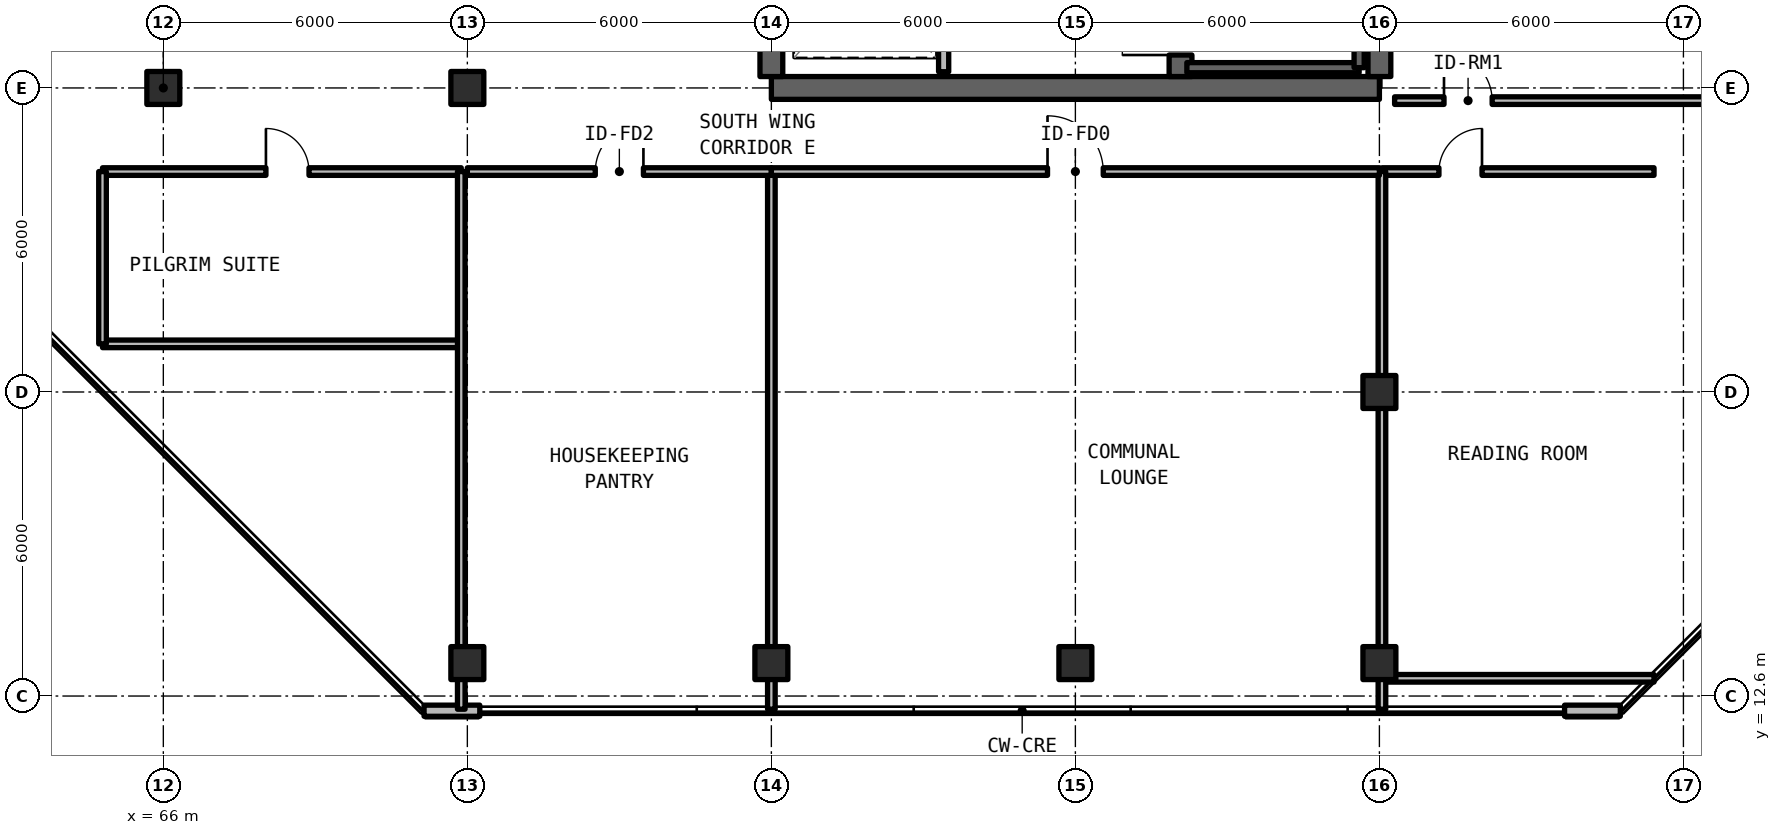
"""IFC4 building model, lengths in metres.
Left out: names, types, materials, properties, quantities, classifications, styles, units other than length and angle.
Written with IfcOpenShell. Run it as: python <this file> out.ifc"""

import sys

from ifc_helpers import new_model, si_unit, direction, frame, frame_2d, origin, origin_2d, place, context, subcontext, project, spatial, rectangle, extrude, element, fill, save


model = new_model("IFC4")
c1 = context("Model", 3, precision=1e-05, world=origin(), true_north=direction((0.0, 1.0)))
c2 = subcontext(c1, "Body", "Model", "MODEL_VIEW")
j1 = project(units=[si_unit("LENGTHUNIT", "METRE"), si_unit("PLANEANGLEUNIT", "RADIAN")], contexts=[c1])
p1 = place(None, origin())
s1 = spatial("IfcSite", under=j1, at=p1, CompositionType="ELEMENT")
p2 = place(p1, origin())
s2 = spatial("IfcBuilding", under=s1, at=p2, CompositionType="ELEMENT")
p3 = place(p2, frame((0.0, 0.0, 257.07)))
s3 = spatial("IfcBuildingStorey", under=s2, at=p3, CompositionType="ELEMENT", Elevation=257.07)
p4 = place(p3, frame((78.0, 24.6, 0.0), z_axis=(0.0, 0.0, 1.0), x_axis=(1.0, 0.0, 0.0)))
e1 = element("IfcWall", 1, at=p4, inside=s3, PredefinedType="SHEAR", context=c2, shape_type="SweptSolid", body=[
    extrude(rectangle(XDim=12.0, YDim=0.45, at=frame_2d((6.0, 0.0))), origin(), (0.0, 0.0, 1.0), 3.63),
])
p5 = place(p3, frame((90.0, 24.825, 0.0), z_axis=(0.0, 0.0, 1.0), x_axis=(0.0, 1.0, 0.0)))
e2 = element("IfcWall", 2, at=p5, inside=s3, PredefinedType="SHEAR", context=c2, shape_type="SweptSolid", body=[
    extrude(rectangle(XDim=17.55, YDim=0.45, at=frame_2d((8.775, 0.0))), origin(), (0.0, 0.0, 1.0), 3.63),
])
p6 = place(p3, frame((78.0, 24.825, 0.0), z_axis=(0.0, 0.0, 1.0), x_axis=(0.0, 1.0, 0.0)))
e3 = element("IfcWall", 3, at=p6, inside=s3, PredefinedType="SHEAR", context=c2, shape_type="SweptSolid", body=[
    extrude(rectangle(XDim=8.975, YDim=0.45, at=frame_2d((4.488, 0.0))), origin(), (0.0, 0.0, 1.0), 3.63),
])
p7 = place(p3, frame((86.075, 24.825, 0.0), z_axis=(0.0, 0.0, 1.0), x_axis=(0.0, 1.0, 0.0)))
e4 = element("IfcWall", 4, at=p7, inside=s3, PredefinedType="SHEAR", context=c2, shape_type="SweptSolid", body=[
    extrude(rectangle(XDim=17.55, YDim=0.45, at=frame_2d((8.775, 0.0))), origin(), (0.0, 0.0, 1.0), 3.63),
])
p8 = place(p7, frame((0.425, 0.0, 0.0)))
e5 = element("IfcOpeningElement", 5, at=p8, cuts=e4, PredefinedType="OPENING", context=c2, shape_type="SweptSolid", body=[
    extrude(rectangle(XDim=1.15, YDim=2.15, at=frame_2d((0.575, 1.075))), frame((0.0, 0.235, 0.0), z_axis=(0.0, -1.0, 0.0), x_axis=(1.0, 0.0, 0.0)), (0.0, 0.0, 1.0), 0.47),
])
p9 = place(p7, frame((9.625, 0.0, 0.0)))
e6 = element("IfcOpeningElement", 6, at=p9, cuts=e4, PredefinedType="OPENING", context=c2, shape_type="SweptSolid", body=[
    extrude(rectangle(XDim=1.15, YDim=2.15, at=frame_2d((0.575, 1.075))), frame((0.0, 0.235, 0.0), z_axis=(0.0, -1.0, 0.0), x_axis=(1.0, 0.0, 0.0)), (0.0, 0.0, 1.0), 0.47),
])
for number, where, z_axis, x_axis in (
    (7, (66.0, 24.6, 0.0), (0.0, 0.0, 1.0), (1.0, 0.0, 0.0)),
    (8, (72.0, 24.6, 0.0), (0.0, 0.0, 1.0), (1.0, 0.0, 0.0)),
    (9, (90.0, 18.6, 0.0), (0.0, 0.0, 1.0), (1.0, 0.0, 0.0)),
    (10, (72.0, 13.25, 0.0), (0.0, 0.0, 1.0), (1.0, 0.0, 0.0)),
    (11, (78.0, 13.25, 0.0), (0.0, 0.0, 1.0), (1.0, 0.0, 0.0)),
    (12, (84.0, 13.25, 0.0), (0.0, 0.0, 1.0), (1.0, 0.0, 0.0)),
    (13, (90.0, 13.25, 0.0), (0.0, 0.0, 1.0), (1.0, 0.0, 0.0)),
):
    element("IfcColumn", number, at=place(p3, frame(where, z_axis=z_axis, x_axis=x_axis)), inside=s3, PredefinedType="COLUMN", context=c2, shape_type="SweptSolid", body=[
        extrude(rectangle(XDim=0.65, YDim=0.65, at=origin_2d()), origin(), (0.0, 0.0, 1.0), 3.63),
    ])
for number, where, z_axis, x_axis in (
    (14, (71.146, 12.31, 0.0), (0.0, 0.0, 1.0), (1.0, 0.0, 0.0)),
    (15, (93.654, 12.31, 0.0), (0.0, 0.0, 1.0), (1.0, 0.0, 0.0)),
):
    element("IfcWall", number, at=place(p3, frame(where, z_axis=z_axis, x_axis=x_axis)), inside=s3, PredefinedType="SOLIDWALL", context=c2, shape_type="SweptSolid", body=[
        extrude(rectangle(XDim=1.1, YDim=0.22, at=frame_2d((0.55, 0.0))), origin(), (0.0, 0.0, 1.0), 3.41),
    ])
p10 = place(p3, frame((81.4, 24.92, 0.0), z_axis=(0.0, 0.0, 1.0), x_axis=(0.0, 1.0, 0.0)))
e16 = element("IfcWall", 16, at=p10, inside=s3, PredefinedType="SOLIDWALL", context=c2, shape_type="SweptSolid", body=[
    extrude(rectangle(XDim=3.58, YDim=0.2, at=frame_2d((1.79, 0.0))), origin(), (0.0, 0.0, 1.0), 2.63),
])
p11 = place(p10, frame((1.3, 0.0, 0.0)))
e17 = element("IfcOpeningElement", 17, at=p11, cuts=e16, PredefinedType="OPENING", context=c2, shape_type="SweptSolid", body=[
    extrude(rectangle(XDim=1.1, YDim=2.2, at=frame_2d((0.55, 1.1))), frame((0.0, 0.11, 0.0), z_axis=(0.0, -1.0, 0.0), x_axis=(1.0, 0.0, 0.0)), (0.0, 0.0, 1.0), 0.22),
])
p12 = place(p3, frame((64.8, 19.55, 0.0), z_axis=(0.0, 0.0, 1.0), x_axis=(1.0, 0.0, 0.0)))
e18 = element("IfcWall", 18, at=p12, inside=s3, PredefinedType="SOLIDWALL", context=c2, shape_type="SweptSolid", body=[
    extrude(rectangle(XDim=7.08, YDim=0.15, at=frame_2d((3.54, 0.0))), origin(), (0.0, 0.0, 1.0), 2.63),
])
p13 = place(p3, frame((64.8, 22.95, 0.0), z_axis=(0.0, 0.0, 1.0), x_axis=(1.0, 0.0, 0.0)))
e19 = element("IfcWall", 19, at=p13, inside=s3, PredefinedType="SOLIDWALL", context=c2, shape_type="SweptSolid", body=[
    extrude(rectangle(XDim=7.08, YDim=0.15, at=frame_2d((3.54, 0.0))), origin(), (0.0, 0.0, 1.0), 2.63),
])
p14 = place(p13, frame((3.225, 0.0, 0.0)))
e20 = element("IfcOpeningElement", 20, at=p14, cuts=e19, PredefinedType="OPENING", context=c2, shape_type="SweptSolid", body=[
    extrude(rectangle(XDim=0.85, YDim=2.1, at=frame_2d((0.425, 1.05))), frame((0.0, 0.085, 0.0), z_axis=(0.0, -1.0, 0.0), x_axis=(1.0, 0.0, 0.0)), (0.0, 0.0, 1.0), 0.17),
])
p15 = place(p3, frame((64.8, 19.55, 0.0), z_axis=(0.0, 0.0, 1.0), x_axis=(0.0, 1.0, 0.0)))
e21 = element("IfcWall", 21, at=p15, inside=s3, PredefinedType="SOLIDWALL", context=c2, shape_type="SweptSolid", body=[
    extrude(rectangle(XDim=3.4, YDim=0.15, at=frame_2d((1.7, 0.0))), origin(), (0.0, 0.0, 1.0), 2.63),
])
p16 = place(p3, frame((71.88, 12.34, 0.0), z_axis=(0.0, 0.0, 1.0), x_axis=(0.0, 1.0, 0.0)))
e22 = element("IfcWall", 22, at=p16, inside=s3, PredefinedType="SOLIDWALL", context=c2, shape_type="SweptSolid", body=[
    extrude(rectangle(XDim=10.61, YDim=0.15, at=frame_2d((5.305, 0.0))), origin(), (0.0, 0.0, 1.0), 2.63),
])
p17 = place(p3, frame((90.3, 24.35, 0.0), z_axis=(0.0, 0.0, 1.0), x_axis=(1.0, 0.0, 0.0)))
e23 = element("IfcWall", 23, at=p17, inside=s3, PredefinedType="SOLIDWALL", context=c2, shape_type="SweptSolid", body=[
    extrude(rectangle(XDim=8.52, YDim=0.15, at=frame_2d((4.26, 0.0))), origin(), (0.0, 0.0, 1.0), 2.63),
])
p18 = place(p17, frame((0.975, 0.0, 0.0)))
e24 = element("IfcOpeningElement", 24, at=p18, cuts=e23, PredefinedType="OPENING", context=c2, shape_type="SweptSolid", body=[
    extrude(rectangle(XDim=0.95, YDim=2.15, at=frame_2d((0.475, 1.075))), frame((0.0, 0.085, 0.0), z_axis=(0.0, -1.0, 0.0), x_axis=(1.0, 0.0, 0.0)), (0.0, 0.0, 1.0), 0.17),
])
p19 = place(p3, frame((90.05, 12.95, 0.0), z_axis=(0.0, 0.0, 1.0), x_axis=(1.0, 0.0, 0.0)))
e25 = element("IfcWall", 25, at=p19, inside=s3, PredefinedType="SOLIDWALL", context=c2, shape_type="SweptSolid", body=[
    extrude(rectangle(XDim=5.37, YDim=0.15, at=frame_2d((2.685, 0.0))), origin(), (0.0, 0.0, 1.0), 2.63),
])
p20 = place(p3, frame((90.05, 22.95, 0.0), z_axis=(0.0, 0.0, 1.0), x_axis=(1.0, 0.0, 0.0)))
e26 = element("IfcWall", 26, at=p20, inside=s3, PredefinedType="SOLIDWALL", context=c2, shape_type="SweptSolid", body=[
    extrude(rectangle(XDim=5.37, YDim=0.15, at=frame_2d((2.685, 0.0))), origin(), (0.0, 0.0, 1.0), 2.63),
])
p21 = place(p20, frame((1.125, 0.0, 0.0)))
e27 = element("IfcOpeningElement", 27, at=p21, cuts=e26, PredefinedType="OPENING", context=c2, shape_type="SweptSolid", body=[
    extrude(rectangle(XDim=0.85, YDim=2.1, at=frame_2d((0.425, 1.05))), frame((0.0, 0.085, 0.0), z_axis=(0.0, -1.0, 0.0), x_axis=(1.0, 0.0, 0.0)), (0.0, 0.0, 1.0), 0.17),
])
for number, where, z_axis, x_axis in (
    (28, (90.05, 12.34, 0.0), (0.0, 0.0, 1.0), (0.0, 1.0, 0.0)),
    (29, (78.0, 12.34, 0.0), (0.0, 0.0, 1.0), (0.0, 1.0, 0.0)),
):
    element("IfcWall", number, at=place(p3, frame(where, z_axis=z_axis, x_axis=x_axis)), inside=s3, PredefinedType="SOLIDWALL", context=c2, shape_type="SweptSolid", body=[
        extrude(rectangle(XDim=10.61, YDim=0.15, at=frame_2d((5.305, 0.0))), origin(), (0.0, 0.0, 1.0), 2.63),
    ])
p22 = place(p3, frame((72.0, 22.95, 0.0), z_axis=(0.0, 0.0, 1.0), x_axis=(1.0, 0.0, 0.0)))
e30 = element("IfcWall", 30, at=p22, inside=s3, PredefinedType="SOLIDWALL", context=c2, shape_type="SweptSolid", body=[
    extrude(rectangle(XDim=6.0, YDim=0.15, at=frame_2d((3.0, 0.0))), origin(), (0.0, 0.0, 1.0), 2.63),
])
p23 = place(p22, frame((2.525, 0.0, 0.0)))
e31 = element("IfcOpeningElement", 31, at=p23, cuts=e30, PredefinedType="OPENING", context=c2, shape_type="SweptSolid", body=[
    extrude(rectangle(XDim=0.95, YDim=2.15, at=frame_2d((0.475, 1.075))), frame((0.0, 0.085, 0.0), z_axis=(0.0, -1.0, 0.0), x_axis=(1.0, 0.0, 0.0)), (0.0, 0.0, 1.0), 0.17),
])
p24 = place(p3, frame((78.0, 22.95, 0.0), z_axis=(0.0, 0.0, 1.0), x_axis=(1.0, 0.0, 0.0)))
e32 = element("IfcWall", 32, at=p24, inside=s3, PredefinedType="SOLIDWALL", context=c2, shape_type="SweptSolid", body=[
    extrude(rectangle(XDim=12.0, YDim=0.15, at=frame_2d((6.0, 0.0))), origin(), (0.0, 0.0, 1.0), 2.63),
])
p25 = place(p24, frame((5.45, 0.0, 0.0)))
e33 = element("IfcOpeningElement", 33, at=p25, cuts=e32, PredefinedType="OPENING", context=c2, shape_type="SweptSolid", body=[
    extrude(rectangle(XDim=1.1, YDim=2.15, at=frame_2d((0.55, 1.075))), frame((0.0, 0.085, 0.0), z_axis=(0.0, -1.0, 0.0), x_axis=(1.0, 0.0, 0.0)), (0.0, 0.0, 1.0), 0.17),
])
p26 = place(p3, frame((86.2, 25.0, 0.0), z_axis=(0.0, 0.0, 1.0), x_axis=(1.0, 0.0, 0.0)))
e34 = element("IfcWall", 34, at=p26, inside=s3, PredefinedType="SOLIDWALL", context=c2, shape_type="SweptSolid", body=[
    extrude(rectangle(XDim=3.4, YDim=0.2, at=frame_2d((1.7, 0.0))), origin(), (0.0, 0.0, 1.0), 3.63),
])
p27 = place(p3, frame((89.6, 25.0, 0.0), z_axis=(0.0, 0.0, 1.0), x_axis=(0.0, 1.0, 0.0)))
e35 = element("IfcWall", 35, at=p27, inside=s3, PredefinedType="SOLIDWALL", context=c2, shape_type="SweptSolid", body=[
    extrude(rectangle(XDim=8.0, YDim=0.2, at=frame_2d((4.0, 0.0))), origin(), (0.0, 0.0, 1.0), 3.63),
])
p28 = place(p14, origin())
e36 = element("IfcDoor", 36, at=p28, inside=s3, OperationType="SINGLE_SWING_LEFT", PredefinedType="DOOR", context=c2, shape_type="SweptSolid", body=[
    extrude(rectangle(XDim=0.85, YDim=2.1, at=frame_2d((0.425, 1.05))), frame((0.0, 0.025, 0.0), z_axis=(0.0, -1.0, 0.0), x_axis=(1.0, 0.0, 0.0)), (0.0, 0.0, 1.0), 0.05),
])
fill(e20, e36)
p29 = place(p18, origin())
e37 = element("IfcDoor", 37, at=p29, inside=s3, OperationType="SINGLE_SWING_LEFT", PredefinedType="DOOR", context=c2, shape_type="SweptSolid", body=[
    extrude(rectangle(XDim=0.95, YDim=2.15, at=frame_2d((0.475, 1.075))), frame((0.0, 0.025, 0.0), z_axis=(0.0, -1.0, 0.0), x_axis=(1.0, 0.0, 0.0)), (0.0, 0.0, 1.0), 0.05),
])
fill(e24, e37)
p30 = place(p21, origin())
e38 = element("IfcDoor", 38, at=p30, inside=s3, OperationType="SINGLE_SWING_RIGHT", PredefinedType="DOOR", context=c2, shape_type="SweptSolid", body=[
    extrude(rectangle(XDim=0.85, YDim=2.1, at=frame_2d((0.425, 1.05))), frame((0.0, 0.025, 0.0), z_axis=(0.0, -1.0, 0.0), x_axis=(1.0, 0.0, 0.0)), (0.0, 0.0, 1.0), 0.05),
])
fill(e27, e38)
p31 = place(p23, origin())
e39 = element("IfcDoor", 39, at=p31, inside=s3, OperationType="SINGLE_SWING_RIGHT", PredefinedType="DOOR", context=c2, shape_type="SweptSolid", body=[
    extrude(rectangle(XDim=0.95, YDim=2.15, at=frame_2d((0.475, 1.075))), frame((0.0, 0.025, 0.0), z_axis=(0.0, -1.0, 0.0), x_axis=(1.0, 0.0, 0.0)), (0.0, 0.0, 1.0), 0.05),
])
fill(e31, e39)
p32 = place(p25, origin())
e40 = element("IfcDoor", 40, at=p32, inside=s3, OperationType="SINGLE_SWING_LEFT", PredefinedType="DOOR", context=c2, shape_type="SweptSolid", body=[
    extrude(rectangle(XDim=1.1, YDim=2.15, at=frame_2d((0.55, 1.075))), frame((0.0, 0.025, 0.0), z_axis=(0.0, -1.0, 0.0), x_axis=(1.0, 0.0, 0.0)), (0.0, 0.0, 1.0), 0.05),
])
fill(e33, e40)
p33 = place(p8, origin())
e41 = element("IfcDoor", 41, at=p33, inside=s3, OperationType="SINGLE_SWING_LEFT", PredefinedType="DOOR", context=c2, shape_type="SweptSolid", body=[
    extrude(rectangle(XDim=1.15, YDim=2.15, at=frame_2d((0.575, 1.075))), frame((0.0, 0.025, 0.0), z_axis=(0.0, -1.0, 0.0), x_axis=(1.0, 0.0, 0.0)), (0.0, 0.0, 1.0), 0.05),
])
fill(e5, e41)
save(model, sys.argv[1])
